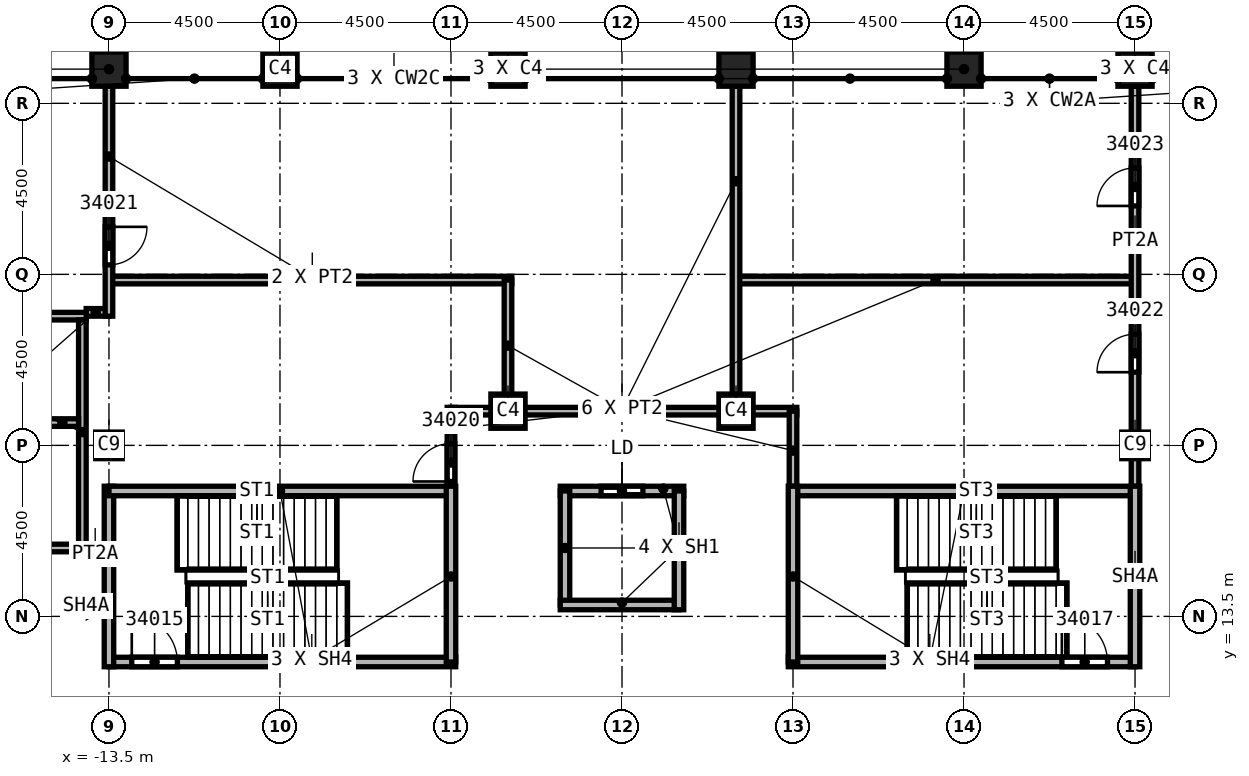
"""IFC4 building model, lengths in metres.
Left out: names, types, materials, properties, quantities, classifications, styles, units other than length and angle.
Written with IfcOpenShell. Run it as: python <this file> out.ifc"""

import sys

from ifc_helpers import new_model, si_unit, direction, frame, frame_2d, origin, origin_2d, place, context, subcontext, project, spatial, rectangle, extrude, element, fill, save


model = new_model("IFC4")
c1 = context("Model", 3, precision=1e-05, world=origin(), true_north=direction((0.0, 1.0)))
c2 = subcontext(c1, "Body", "Model", "MODEL_VIEW")
j1 = project(units=[si_unit("LENGTHUNIT", "METRE"), si_unit("PLANEANGLEUNIT", "RADIAN")], contexts=[c1])
p1 = place(None, origin())
s1 = spatial("IfcSite", under=j1, at=p1, CompositionType="ELEMENT")
p2 = place(p1, origin())
s2 = spatial("IfcBuilding", under=s1, at=p2, CompositionType="ELEMENT")
p3 = place(p2, frame((0.0, 0.0, 366.0)))
s3 = spatial("IfcBuildingStorey", under=s2, at=p3, CompositionType="ELEMENT", Elevation=366.0)
for number, where, z_axis, x_axis in (
    (1, (13.5, 18.0, 0.0), (0.0, 0.0, 1.0), (1.0, 0.0, 0.0)),
    (2, (-13.5, 18.0, 0.0), (0.0, 0.0, 1.0), (1.0, 0.0, 0.0)),
):
    element("IfcColumn", number, at=place(p3, frame(where, z_axis=z_axis, x_axis=x_axis)), inside=s3, PredefinedType="COLUMN", context=c2, shape_type="SweptSolid", body=[
        extrude(rectangle(XDim=0.7, YDim=0.7, at=origin_2d()), origin(), (0.0, 0.0, 1.0), 9.6),
    ])
for number, where, z_axis, x_axis in (
    (3, (3.0, 27.9, 0.0), (0.0, 0.0, 1.0), (1.0, 0.0, 0.0)),
    (4, (9.0, 27.9, 0.0), (0.0, 0.0, 1.0), (1.0, 0.0, 0.0)),
    (5, (13.5, 27.9, 0.0), (0.0, 0.0, 1.0), (1.0, 0.0, 0.0)),
    (6, (-3.0, 27.9, 0.0), (0.0, 0.0, 1.0), (1.0, 0.0, 0.0)),
    (7, (-9.0, 27.9, 0.0), (0.0, 0.0, 1.0), (1.0, 0.0, 0.0)),
    (8, (-13.5, 27.9, 0.0), (0.0, 0.0, 1.0), (1.0, 0.0, 0.0)),
    (9, (3.0, 18.9, 0.0), (0.0, 0.0, 1.0), (1.0, 0.0, 0.0)),
    (10, (-3.0, 18.9, 0.0), (0.0, 0.0, 1.0), (1.0, 0.0, 0.0)),
):
    element("IfcColumn", number, at=place(p3, frame(where, z_axis=z_axis, x_axis=x_axis)), inside=s3, PredefinedType="COLUMN", context=c2, shape_type="SweptSolid", body=[
        extrude(rectangle(XDim=0.9, YDim=0.9, at=origin_2d()), origin(), (0.0, 0.0, 1.0), 9.6),
    ])
p4 = place(p3, frame((-14.1, 15.2, 0.0), z_axis=(0.0, 0.0, 1.0), x_axis=(1.0, 0.0, 0.0)))
e11 = element("IfcWall", 11, at=p4, inside=s3, PredefinedType="PARTITIONING", context=c2, shape_type="SweptSolid", body=[
    extrude(rectangle(XDim=0.725, YDim=0.2, at=frame_2d((0.363, 0.0))), origin(), (0.0, 0.0, 1.0), 5.76),
])
p5 = place(p3, frame((-13.5, 21.5, 0.0), z_axis=(0.0, 0.0, 1.0), x_axis=(-1.0, 0.0, 0.0)))
e12 = element("IfcWall", 12, at=p5, inside=s3, PredefinedType="PARTITIONING", context=c2, shape_type="SweptSolid", body=[
    extrude(rectangle(XDim=0.6, YDim=0.2, at=frame_2d((0.3, 0.0))), origin(), (0.0, 0.0, 1.0), 9.15),
])
p6 = place(p3, frame((-13.5, 22.35, 0.0), z_axis=(0.0, 0.0, 1.0), x_axis=(1.0, 0.0, 0.0)))
e13 = element("IfcWall", 13, at=p6, inside=s3, PredefinedType="PARTITIONING", context=c2, shape_type="SweptSolid", body=[
    extrude(rectangle(XDim=10.6, YDim=0.2, at=frame_2d((5.3, 0.0))), origin(), (0.0, 0.0, 1.0), 9.15),
])
p7 = place(p3, frame((-13.5, 27.45, 0.0), z_axis=(0.0, 0.0, 1.0), x_axis=(0.0, -1.0, 0.0)))
e14 = element("IfcWall", 14, at=p7, inside=s3, PredefinedType="PARTITIONING", context=c2, shape_type="SweptSolid", body=[
    extrude(rectangle(XDim=6.05, YDim=0.2, at=frame_2d((3.025, 0.0))), origin(), (0.0, 0.0, 1.0), 9.15),
])
p8 = place(p7, frame((3.7, 0.0, 0.0)))
e15 = element("IfcOpeningElement", 15, at=p8, cuts=e14, PredefinedType="OPENING", context=c2, shape_type="SweptSolid", body=[
    extrude(rectangle(XDim=1.0, YDim=2.1, at=frame_2d((0.5, 1.05))), frame((0.0, 0.1, 0.0), z_axis=(0.0, -1.0, 0.0), x_axis=(1.0, 0.0, 0.0)), (0.0, 0.0, 1.0), 0.2),
])
p9 = place(p3, frame((-4.5, 16.8, 0.0), z_axis=(0.0, 0.0, 1.0), x_axis=(0.0, 1.0, 0.0)))
e16 = element("IfcWall", 16, at=p9, inside=s3, PredefinedType="PARTITIONING", context=c2, shape_type="SweptSolid", body=[
    extrude(rectangle(XDim=2.2, YDim=0.2, at=frame_2d((1.1, 0.0))), origin(), (0.0, 0.0, 1.0), 9.15),
])
p10 = place(p9, frame((0.25, 0.0, 0.0)))
e17 = element("IfcOpeningElement", 17, at=p10, cuts=e16, PredefinedType="OPENING", context=c2, shape_type="SweptSolid", body=[
    extrude(rectangle(XDim=1.0, YDim=2.1, at=frame_2d((0.5, 1.05))), frame((0.0, 0.1, 0.0), z_axis=(0.0, -1.0, 0.0), x_axis=(1.0, 0.0, 0.0)), (0.0, 0.0, 1.0), 0.2),
])
p11 = place(p3, frame((-4.5, 18.9, 0.0), z_axis=(0.0, 0.0, 1.0), x_axis=(1.0, 0.0, 0.0)))
e18 = element("IfcWall", 18, at=p11, inside=s3, PredefinedType="PARTITIONING", context=c2, shape_type="SweptSolid", body=[
    extrude(rectangle(XDim=9.1, YDim=0.2, at=frame_2d((4.55, 0.0))), origin(), (0.0, 0.0, 1.0), 9.15),
])
p12 = place(p3, frame((-3.0, 22.35, 0.0), z_axis=(0.0, 0.0, 1.0), x_axis=(0.0, -1.0, 0.0)))
e19 = element("IfcWall", 19, at=p12, inside=s3, PredefinedType="PARTITIONING", context=c2, shape_type="SweptSolid", body=[
    extrude(rectangle(XDim=3.45, YDim=0.2, at=frame_2d((1.725, 0.0))), origin(), (0.0, 0.0, 1.0), 9.15),
])
p13 = place(p3, frame((3.0, 22.35, 0.0), z_axis=(0.0, 0.0, 1.0), x_axis=(1.0, 0.0, 0.0)))
e20 = element("IfcWall", 20, at=p13, inside=s3, PredefinedType="PARTITIONING", context=c2, shape_type="SweptSolid", body=[
    extrude(rectangle(XDim=10.5, YDim=0.2, at=frame_2d((5.25, 0.0))), origin(), (0.0, 0.0, 1.0), 9.15),
])
p14 = place(p3, frame((3.0, 27.45, 0.0), z_axis=(0.0, 0.0, 1.0), x_axis=(0.0, -1.0, 0.0)))
e21 = element("IfcWall", 21, at=p14, inside=s3, PredefinedType="PARTITIONING", context=c2, shape_type="SweptSolid", body=[
    extrude(rectangle(XDim=8.55, YDim=0.2, at=frame_2d((4.275, 0.0))), origin(), (0.0, 0.0, 1.0), 9.15),
])
p15 = place(p3, frame((4.5, 18.9, 0.0), z_axis=(0.0, 0.0, 1.0), x_axis=(0.0, -1.0, 0.0)))
e22 = element("IfcWall", 22, at=p15, inside=s3, PredefinedType="PARTITIONING", context=c2, shape_type="SweptSolid", body=[
    extrude(rectangle(XDim=2.1, YDim=0.2, at=frame_2d((1.05, 0.0))), origin(), (0.0, 0.0, 1.0), 9.15),
])
p16 = place(p3, frame((13.5, 16.675, 0.0), z_axis=(0.0, 0.0, 1.0), x_axis=(0.0, 1.0, 0.0)))
e23 = element("IfcWall", 23, at=p16, inside=s3, PredefinedType="PARTITIONING", context=c2, shape_type="SweptSolid", body=[
    extrude(rectangle(XDim=10.775, YDim=0.2, at=frame_2d((5.387, 0.0))), origin(), (0.0, 0.0, 1.0), 5.76),
])
p17 = place(p16, frame((3.25, 0.0, 0.0)))
e24 = element("IfcOpeningElement", 24, at=p17, cuts=e23, PredefinedType="OPENING", context=c2, shape_type="SweptSolid", body=[
    extrude(rectangle(XDim=1.0, YDim=2.1, at=frame_2d((0.5, 1.05))), frame((0.0, 0.1, 0.0), z_axis=(0.0, -1.0, 0.0), x_axis=(1.0, 0.0, 0.0)), (0.0, 0.0, 1.0), 0.2),
])
p18 = place(p16, frame((7.625, 0.0, 0.0)))
e25 = element("IfcOpeningElement", 25, at=p18, cuts=e23, PredefinedType="OPENING", context=c2, shape_type="SweptSolid", body=[
    extrude(rectangle(XDim=1.0, YDim=2.1, at=frame_2d((0.5, 1.05))), frame((0.0, 0.1, 0.0), z_axis=(0.0, -1.0, 0.0), x_axis=(1.0, 0.0, 0.0)), (0.0, 0.0, 1.0), 0.2),
])
p19 = place(p3, frame((-1.625, 16.8, 0.0), z_axis=(0.0, 0.0, 1.0), x_axis=(1.0, 0.0, 0.0)))
e26 = element("IfcWall", 26, at=p19, inside=s3, PredefinedType="SOLIDWALL", context=c2, shape_type="SweptSolid", body=[
    extrude(rectangle(XDim=3.25, YDim=0.25, at=frame_2d((1.625, 0.0))), origin(), (0.0, 0.0, 1.0), 9.15),
])
p20 = place(p19, frame((1.075, 0.0, 0.0)))
e27 = element("IfcOpeningElement", 27, at=p20, cuts=e26, PredefinedType="OPENING", context=c2, shape_type="SweptSolid", body=[
    extrude(rectangle(XDim=1.1, YDim=2.1, at=frame_2d((0.55, 1.05))), frame((0.0, 0.125, 0.0), z_axis=(0.0, -1.0, 0.0), x_axis=(1.0, 0.0, 0.0)), (0.0, 0.0, 1.0), 0.25),
])
p21 = place(p3, frame((-1.5, 13.8, 0.0), z_axis=(0.0, 0.0, 1.0), x_axis=(0.0, 1.0, 0.0)))
e28 = element("IfcWall", 28, at=p21, inside=s3, PredefinedType="SOLIDWALL", context=c2, shape_type="SweptSolid", body=[
    extrude(rectangle(XDim=3.0, YDim=0.25, at=frame_2d((1.5, 0.0))), origin(), (0.0, 0.0, 1.0), 9.15),
])
for number, where, z_axis, x_axis in (
    (29, (1.5, 13.8, 0.0), (0.0, 0.0, 1.0), (-1.0, 0.0, 0.0)),
    (30, (1.5, 16.8, 0.0), (0.0, 0.0, 1.0), (0.0, -1.0, 0.0)),
):
    element("IfcWall", number, at=place(p3, frame(where, z_axis=z_axis, x_axis=x_axis)), inside=s3, PredefinedType="SOLIDWALL", context=c2, shape_type="SweptSolid", body=[
        extrude(rectangle(XDim=3.125, YDim=0.25, at=frame_2d((1.562, 0.0))), origin(), (0.0, 0.0, 1.0), 9.15),
    ])
p22 = place(p3, frame((-13.5, 12.3, 0.0), z_axis=(0.0, 0.0, 1.0), x_axis=(1.0, 0.0, 0.0)))
e31 = element("IfcWall", 31, at=p22, inside=s3, PredefinedType="SOLIDWALL", context=c2, shape_type="SweptSolid", body=[
    extrude(rectangle(XDim=9.125, YDim=0.25, at=frame_2d((4.562, 0.0))), origin(), (0.0, 0.0, 1.0), 9.15),
])
p23 = place(p22, frame((0.6, 0.0, 0.0)))
e32 = element("IfcOpeningElement", 32, at=p23, cuts=e31, PredefinedType="OPENING", context=c2, shape_type="SweptSolid", body=[
    extrude(rectangle(XDim=1.2, YDim=2.1, at=frame_2d((0.6, 1.05))), frame((0.0, 0.125, 0.0), z_axis=(0.0, -1.0, 0.0), x_axis=(1.0, 0.0, 0.0)), (0.0, 0.0, 1.0), 0.25),
])
p24 = place(p3, frame((-13.5, 12.175, 0.0), z_axis=(0.0, 0.0, 1.0), x_axis=(0.0, 1.0, 0.0)))
e33 = element("IfcWall", 33, at=p24, inside=s3, PredefinedType="SOLIDWALL", context=c2, shape_type="SweptSolid", body=[
    extrude(rectangle(XDim=4.75, YDim=0.25, at=frame_2d((2.375, 0.0))), origin(), (0.0, 0.0, 1.0), 5.76),
])
p25 = place(p3, frame((-13.5, 16.8, 0.0), z_axis=(0.0, 0.0, 1.0), x_axis=(1.0, 0.0, 0.0)))
e34 = element("IfcWall", 34, at=p25, inside=s3, PredefinedType="SOLIDWALL", context=c2, shape_type="SweptSolid", body=[
    extrude(rectangle(XDim=9.1, YDim=0.25, at=frame_2d((4.55, 0.0))), origin(), (0.0, 0.0, 1.0), 9.15),
])
p26 = place(p3, frame((-4.5, 16.925, 0.0), z_axis=(0.0, 0.0, 1.0), x_axis=(0.0, -1.0, 0.0)))
e35 = element("IfcWall", 35, at=p26, inside=s3, PredefinedType="SOLIDWALL", context=c2, shape_type="SweptSolid", body=[
    extrude(rectangle(XDim=4.625, YDim=0.25, at=frame_2d((2.312, 0.0))), origin(), (0.0, 0.0, 1.0), 9.15),
])
p27 = place(p3, frame((4.375, 12.3, 0.0), z_axis=(0.0, 0.0, 1.0), x_axis=(1.0, 0.0, 0.0)))
e36 = element("IfcWall", 36, at=p27, inside=s3, PredefinedType="SOLIDWALL", context=c2, shape_type="SweptSolid", body=[
    extrude(rectangle(XDim=9.125, YDim=0.25, at=frame_2d((4.562, 0.0))), origin(), (0.0, 0.0, 1.0), 9.15),
])
p28 = place(p27, frame((7.2, 0.0, 0.0)))
e37 = element("IfcOpeningElement", 37, at=p28, cuts=e36, PredefinedType="OPENING", context=c2, shape_type="SweptSolid", body=[
    extrude(rectangle(XDim=1.2, YDim=2.1, at=frame_2d((0.6, 1.05))), frame((0.0, 0.125, 0.0), z_axis=(0.0, -1.0, 0.0), x_axis=(1.0, 0.0, 0.0)), (0.0, 0.0, 1.0), 0.25),
])
p29 = place(p3, frame((4.4, 16.8, 0.0), z_axis=(0.0, 0.0, 1.0), x_axis=(1.0, 0.0, 0.0)))
e38 = element("IfcWall", 38, at=p29, inside=s3, PredefinedType="SOLIDWALL", context=c2, shape_type="SweptSolid", body=[
    extrude(rectangle(XDim=9.1, YDim=0.25, at=frame_2d((4.55, 0.0))), origin(), (0.0, 0.0, 1.0), 9.15),
])
p30 = place(p3, frame((4.5, 12.3, 0.0), z_axis=(0.0, 0.0, 1.0), x_axis=(0.0, 1.0, 0.0)))
e39 = element("IfcWall", 39, at=p30, inside=s3, PredefinedType="SOLIDWALL", context=c2, shape_type="SweptSolid", body=[
    extrude(rectangle(XDim=4.625, YDim=0.25, at=frame_2d((2.312, 0.0))), origin(), (0.0, 0.0, 1.0), 9.15),
])
p31 = place(p3, frame((13.5, 12.175, 0.0), z_axis=(0.0, 0.0, 1.0), x_axis=(0.0, 1.0, 0.0)))
e40 = element("IfcWall", 40, at=p31, inside=s3, PredefinedType="SOLIDWALL", context=c2, shape_type="SweptSolid", body=[
    extrude(rectangle(XDim=4.75, YDim=0.25, at=frame_2d((2.375, 0.0))), origin(), (0.0, 0.0, 1.0), 5.76),
])
p32 = place(p3, frame((-21.9, 15.3, 0.0), z_axis=(0.0, 0.0, 1.0), x_axis=(1.0, 0.0, 0.0)))
e41 = element("IfcWall", 41, at=p32, inside=s3, PredefinedType="SOLIDWALL", context=c2, shape_type="SweptSolid", body=[
    extrude(rectangle(XDim=8.275, YDim=0.2, at=frame_2d((4.137, 0.0))), origin(), (0.0, 0.0, 1.0), 9.15),
])
p33 = place(p32, frame((4.8, 0.0, 0.0)))
e42 = element("IfcOpeningElement", 42, at=p33, cuts=e41, PredefinedType="OPENING", context=c2, shape_type="SweptSolid", body=[
    extrude(rectangle(XDim=1.2, YDim=2.1, at=frame_2d((0.6, 1.05))), frame((0.0, 0.1, 0.0), z_axis=(0.0, -1.0, 0.0), x_axis=(1.0, 0.0, 0.0)), (0.0, 0.0, 1.0), 0.2),
])
p34 = place(p3, frame((-21.9, 21.4, 0.0), z_axis=(0.0, 0.0, 1.0), x_axis=(1.0, 0.0, 0.0)))
e43 = element("IfcWall", 43, at=p34, inside=s3, PredefinedType="SOLIDWALL", context=c2, shape_type="SweptSolid", body=[
    extrude(rectangle(XDim=7.8, YDim=0.2, at=frame_2d((3.9, 0.0))), origin(), (0.0, 0.0, 1.0), 9.15),
])
p35 = place(p34, frame((3.2, 0.0, 0.0)))
e44 = element("IfcOpeningElement", 44, at=p35, cuts=e43, PredefinedType="OPENING", context=c2, shape_type="SweptSolid", body=[
    extrude(rectangle(XDim=1.2, YDim=2.1, at=frame_2d((0.6, 1.05))), frame((0.0, 0.1, 0.0), z_axis=(0.0, -1.0, 0.0), x_axis=(1.0, 0.0, 0.0)), (0.0, 0.0, 1.0), 0.2),
])
p36 = place(p3, frame((-14.2, 15.4, 0.0), z_axis=(0.0, 0.0, 1.0), x_axis=(0.0, 1.0, 0.0)))
e45 = element("IfcWall", 45, at=p36, inside=s3, PredefinedType="SOLIDWALL", context=c2, shape_type="SweptSolid", body=[
    extrude(rectangle(XDim=5.9, YDim=0.2, at=frame_2d((2.95, 0.0))), origin(), (0.0, 0.0, 1.0), 9.15),
])
p37 = place(p3, frame((-17.1, 18.6, 0.0), z_axis=(0.0, 0.0, 1.0), x_axis=(1.0, 0.0, 0.0)))
e46 = element("IfcWall", 46, at=p37, inside=s3, PredefinedType="SOLIDWALL", context=c2, shape_type="SweptSolid", body=[
    extrude(rectangle(XDim=2.8, YDim=0.2, at=frame_2d((1.4, 0.0))), origin(), (0.0, 0.0, 1.0), 9.15),
])
p38 = place(p37, frame((0.85, 0.0, 0.0)))
e47 = element("IfcOpeningElement", 47, at=p38, cuts=e46, PredefinedType="OPENING", context=c2, shape_type="SweptSolid", body=[
    extrude(rectangle(XDim=1.1, YDim=2.1, at=frame_2d((0.55, 1.05))), frame((0.0, 0.1, 0.0), z_axis=(0.0, -1.0, 0.0), x_axis=(1.0, 0.0, 0.0)), (0.0, 0.0, 1.0), 0.2),
])
p39 = place(p23, origin())
e48 = element("IfcDoor", 48, at=p39, inside=s3, OperationType="SINGLE_SWING_RIGHT", PredefinedType="DOOR", context=c2, shape_type="SweptSolid", body=[
    extrude(rectangle(XDim=1.2, YDim=2.1, at=frame_2d((0.6, 1.05))), frame((0.0, 0.025, 0.0), z_axis=(0.0, -1.0, 0.0), x_axis=(1.0, 0.0, 0.0)), (0.0, 0.0, 1.0), 0.05),
])
fill(e32, e48)
p40 = place(p28, origin())
e49 = element("IfcDoor", 49, at=p40, inside=s3, OperationType="SINGLE_SWING_RIGHT", PredefinedType="DOOR", context=c2, shape_type="SweptSolid", body=[
    extrude(rectangle(XDim=1.2, YDim=2.1, at=frame_2d((0.6, 1.05))), frame((0.0, 0.025, 0.0), z_axis=(0.0, -1.0, 0.0), x_axis=(1.0, 0.0, 0.0)), (0.0, 0.0, 1.0), 0.05),
])
fill(e37, e49)
p41 = place(p10, origin())
e50 = element("IfcDoor", 50, at=p41, inside=s3, OperationType="SINGLE_SWING_LEFT", PredefinedType="DOOR", context=c2, shape_type="SweptSolid", body=[
    extrude(rectangle(XDim=1.0, YDim=2.1, at=frame_2d((0.5, 1.05))), frame((0.0, 0.025, 0.0), z_axis=(0.0, -1.0, 0.0), x_axis=(1.0, 0.0, 0.0)), (0.0, 0.0, 1.0), 0.05),
])
fill(e17, e50)
p42 = place(p8, origin())
e51 = element("IfcDoor", 51, at=p42, inside=s3, OperationType="SINGLE_SWING_RIGHT", PredefinedType="DOOR", context=c2, shape_type="SweptSolid", body=[
    extrude(rectangle(XDim=1.0, YDim=2.1, at=frame_2d((0.5, 1.05))), frame((0.0, 0.025, 0.0), z_axis=(0.0, -1.0, 0.0), x_axis=(1.0, 0.0, 0.0)), (0.0, 0.0, 1.0), 0.05),
])
fill(e15, e51)
p43 = place(p17, origin())
e52 = element("IfcDoor", 52, at=p43, inside=s3, OperationType="SINGLE_SWING_LEFT", PredefinedType="DOOR", context=c2, shape_type="SweptSolid", body=[
    extrude(rectangle(XDim=1.0, YDim=2.1, at=frame_2d((0.5, 1.05))), frame((0.0, 0.025, 0.0), z_axis=(0.0, -1.0, 0.0), x_axis=(1.0, 0.0, 0.0)), (0.0, 0.0, 1.0), 0.05),
])
fill(e24, e52)
p44 = place(p18, origin())
e53 = element("IfcDoor", 53, at=p44, inside=s3, OperationType="SINGLE_SWING_RIGHT", PredefinedType="DOOR", context=c2, shape_type="SweptSolid", body=[
    extrude(rectangle(XDim=1.0, YDim=2.1, at=frame_2d((0.5, 1.05))), frame((0.0, 0.025, 0.0), z_axis=(0.0, -1.0, 0.0), x_axis=(1.0, 0.0, 0.0)), (0.0, 0.0, 1.0), 0.05),
])
fill(e25, e53)
p45 = place(p20, origin())
e54 = element("IfcDoor", 54, at=p45, inside=s3, OperationType="SLIDING_TO_LEFT", PredefinedType="DOOR", context=c2, shape_type="SweptSolid", body=[
    extrude(rectangle(XDim=1.1, YDim=2.1, at=frame_2d((0.55, 1.05))), frame((0.0, 0.025, 0.0), z_axis=(0.0, -1.0, 0.0), x_axis=(1.0, 0.0, 0.0)), (0.0, 0.0, 1.0), 0.05),
])
fill(e27, e54)
save(model, sys.argv[1])
